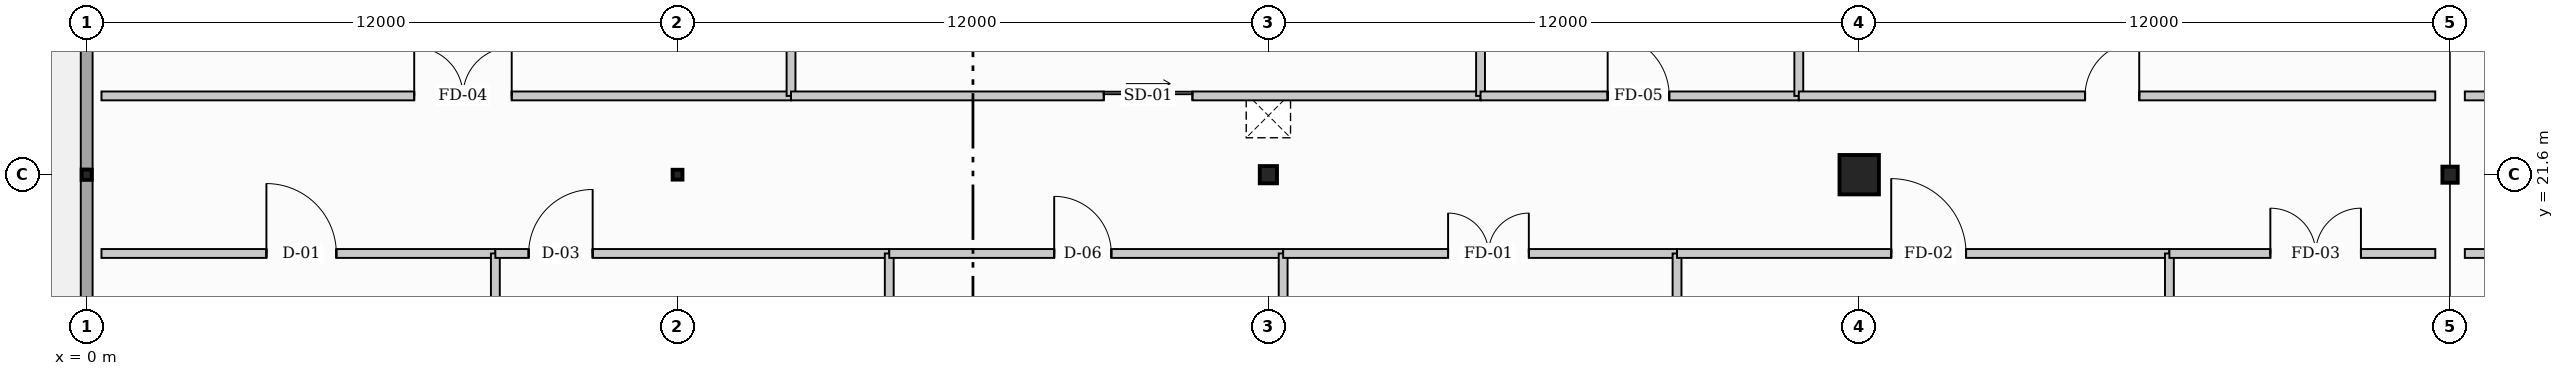
"""IFC4 building model, lengths in metres.
Left out: names, types, materials, properties, quantities, classifications, styles, units other than length and angle.
Written with IfcOpenShell. Run it as: python <this file> out.ifc"""

import sys

from ifc_helpers import new_model, si_unit, direction, frame, frame_2d, origin, origin_2d, place, context, subcontext, project, spatial, rectangle, hollow_rectangle, i_section, extrude, element, fill, save


model = new_model("IFC4")
c1 = context("Model", 3, precision=1e-05, world=origin(), true_north=direction((0.0, 1.0)))
c2 = subcontext(c1, "Body", "Model", "MODEL_VIEW")
j1 = project(units=[si_unit("LENGTHUNIT", "METRE"), si_unit("PLANEANGLEUNIT", "RADIAN")], contexts=[c1])
p1 = place(None, origin())
s1 = spatial("IfcSite", under=j1, at=p1, CompositionType="ELEMENT")
p2 = place(p1, origin())
s2 = spatial("IfcBuilding", under=s1, at=p2, CompositionType="ELEMENT")
p3 = place(p2, frame((0.0, 0.0, -4.8)))
s3 = spatial("IfcBuildingStorey", under=s2, at=p3, CompositionType="ELEMENT", Elevation=-4.8)
p4 = place(p3, frame((0.0, 21.6, 0.0), z_axis=(0.0, 0.0, 1.0), x_axis=(1.0, 0.0, 0.0)))
e1 = element("IfcColumn", 1, at=p4, inside=s3, PredefinedType="COLUMN", context=c2, shape_type="SweptSolid", body=[
    extrude(i_section(OverallWidth=0.205, OverallDepth=0.21, WebThickness=0.009, FlangeThickness=0.014, at=origin_2d()), origin(), (0.0, 0.0, 1.0), 4.8),
])
p5 = place(p3, frame((12.0, 21.6, 0.0), z_axis=(0.0, 0.0, 1.0), x_axis=(0.0, 1.0, 0.0)))
e2 = element("IfcColumn", 2, at=p5, inside=s3, PredefinedType="COLUMN", context=c2, shape_type="SweptSolid", body=[
    extrude(hollow_rectangle(XDim=0.2, YDim=0.2, WallThickness=0.01, at=origin_2d()), origin(), (0.0, 0.0, 1.0), 4.8),
])
p6 = place(p3, frame((24.0, 21.6, 0.0), z_axis=(0.0, 0.0, 1.0), x_axis=(1.0, 0.0, 0.0)))
e3 = element("IfcColumn", 3, at=p6, inside=s3, PredefinedType="COLUMN", context=c2, shape_type="SweptSolid", body=[
    extrude(i_section(OverallWidth=0.35, OverallDepth=0.35, WebThickness=0.014, FlangeThickness=0.024, at=origin_2d()), origin(), (0.0, 0.0, 1.0), 4.8),
])
p7 = place(p3, frame((36.0, 21.6, 0.0), z_axis=(0.0, 0.0, 1.0), x_axis=(0.0, 1.0, 0.0)))
e4 = element("IfcColumn", 4, at=p7, inside=s3, PredefinedType="COLUMN", context=c2, shape_type="SweptSolid", body=[
    extrude(rectangle(XDim=0.8, YDim=0.8, at=origin_2d()), origin(), (0.0, 0.0, 1.0), 4.8),
])
p8 = place(p3, frame((48.0, 21.6, 0.0), z_axis=(0.0, 0.0, 1.0), x_axis=(1.0, 0.0, 0.0)))
e5 = element("IfcColumn", 5, at=p8, inside=s3, PredefinedType="COLUMN", context=c2, shape_type="SweptSolid", body=[
    extrude(i_section(OverallWidth=0.311, OverallDepth=0.327, WebThickness=0.016, FlangeThickness=0.025, at=origin_2d()), origin(), (0.0, 0.0, 1.0), 4.8),
])
p9 = place(p3, frame((0.0, 0.0, 0.0), z_axis=(0.0, 0.0, 1.0), x_axis=(0.0, 1.0, 0.0)))
e6 = element("IfcWall", 6, at=p9, inside=s3, PredefinedType="STANDARD", context=c2, shape_type="SweptSolid", body=[
    extrude(rectangle(XDim=45.6, YDim=0.24, at=frame_2d((22.8, 0.0))), origin(), (0.0, 0.0, 1.0), 3.723),
])
p10 = place(p9, frame((15.0, 0.0, 0.0)))
e7 = element("IfcOpeningElement", 7, at=p10, cuts=e6, PredefinedType="OPENING", context=c2, shape_type="SweptSolid", body=[
    extrude(rectangle(XDim=2.46, YDim=2.4, at=frame_2d((1.23, 1.2))), frame((0.0, 0.13, 0.0), z_axis=(0.0, -1.0, 0.0), x_axis=(1.0, 0.0, 0.0)), (0.0, 0.0, 1.0), 0.26),
])
p11 = place(p9, frame((28.0, 0.0, 0.0)))
e8 = element("IfcOpeningElement", 8, at=p11, cuts=e6, PredefinedType="OPENING", context=c2, shape_type="SweptSolid", body=[
    extrude(rectangle(XDim=2.3, YDim=2.3, at=frame_2d((1.15, 1.15))), frame((0.0, 0.13, 0.0), z_axis=(0.0, -1.0, 0.0), x_axis=(1.0, 0.0, 0.0)), (0.0, 0.0, 1.0), 0.26),
])
p12 = place(p9, frame((1.1, 0.0, 1.0)))
e9 = element("IfcOpeningElement", 9, at=p12, cuts=e6, PredefinedType="OPENING", context=c2, shape_type="SweptSolid", body=[
    extrude(rectangle(XDim=2.4, YDim=1.8, at=frame_2d((1.2, 0.9))), frame((0.0, 0.13, 0.0), z_axis=(0.0, -1.0, 0.0), x_axis=(1.0, 0.0, 0.0)), (0.0, 0.0, 1.0), 0.26),
])
p13 = place(p9, frame((5.0, 0.0, 1.0)))
e10 = element("IfcOpeningElement", 10, at=p13, cuts=e6, PredefinedType="OPENING", context=c2, shape_type="SweptSolid", body=[
    extrude(rectangle(XDim=2.4, YDim=1.8, at=frame_2d((1.2, 0.9))), frame((0.0, 0.13, 0.0), z_axis=(0.0, -1.0, 0.0), x_axis=(1.0, 0.0, 0.0)), (0.0, 0.0, 1.0), 0.26),
])
p14 = place(p9, frame((24.5, 0.0, 1.0)))
e11 = element("IfcOpeningElement", 11, at=p14, cuts=e6, PredefinedType="OPENING", context=c2, shape_type="SweptSolid", body=[
    extrude(rectangle(XDim=2.4, YDim=1.8, at=frame_2d((1.2, 0.9))), frame((0.0, 0.13, 0.0), z_axis=(0.0, -1.0, 0.0), x_axis=(1.0, 0.0, 0.0)), (0.0, 0.0, 1.0), 0.26),
])
p15 = place(p9, frame((36.2, 0.0, 1.0)))
e12 = element("IfcOpeningElement", 12, at=p15, cuts=e6, PredefinedType="OPENING", context=c2, shape_type="SweptSolid", body=[
    extrude(rectangle(XDim=2.4, YDim=1.8, at=frame_2d((1.2, 0.9))), frame((0.0, 0.13, 0.0), z_axis=(0.0, -1.0, 0.0), x_axis=(1.0, 0.0, 0.0)), (0.0, 0.0, 1.0), 0.26),
])
p16 = place(p9, frame((40.1, 0.0, 1.0)))
e13 = element("IfcOpeningElement", 13, at=p16, cuts=e6, PredefinedType="OPENING", context=c2, shape_type="SweptSolid", body=[
    extrude(rectangle(XDim=2.4, YDim=1.8, at=frame_2d((1.2, 0.9))), frame((0.0, 0.13, 0.0), z_axis=(0.0, -1.0, 0.0), x_axis=(1.0, 0.0, 0.0)), (0.0, 0.0, 1.0), 0.26),
])
p17 = place(p3, frame((0.3, 20.0, 0.0), z_axis=(0.0, 0.0, 1.0), x_axis=(1.0, 0.0, 0.0)))
e14 = element("IfcWall", 14, at=p17, inside=s3, PredefinedType="PARTITIONING", context=c2, shape_type="SweptSolid", body=[
    extrude(rectangle(XDim=8.0, YDim=0.18, at=frame_2d((4.0, 0.0))), origin(), (0.0, 0.0, 1.0), 4.012),
])
p18 = place(p17, frame((3.35, 0.0, 0.0)))
e15 = element("IfcOpeningElement", 15, at=p18, cuts=e14, PredefinedType="OPENING", context=c2, shape_type="SweptSolid", body=[
    extrude(rectangle(XDim=1.42, YDim=2.22, at=frame_2d((0.71, 1.11))), frame((0.0, 0.1, 0.0), z_axis=(0.0, -1.0, 0.0), x_axis=(1.0, 0.0, 0.0)), (0.0, 0.0, 1.0), 0.2),
])
p19 = place(p3, frame((8.3, 0.3, 0.0), z_axis=(0.0, 0.0, 1.0), x_axis=(0.0, 1.0, 0.0)))
e16 = element("IfcWall", 16, at=p19, inside=s3, PredefinedType="PARTITIONING", context=c2, shape_type="SweptSolid", body=[
    extrude(rectangle(XDim=19.7, YDim=0.18, at=frame_2d((9.85, 0.0))), origin(), (0.0, 0.0, 1.0), 3.723),
])
p20 = place(p3, frame((8.3, 20.0, 0.0), z_axis=(0.0, 0.0, 1.0), x_axis=(1.0, 0.0, 0.0)))
e17 = element("IfcWall", 17, at=p20, inside=s3, PredefinedType="PARTITIONING", context=c2, shape_type="SweptSolid", body=[
    extrude(rectangle(XDim=8.0, YDim=0.18, at=frame_2d((4.0, 0.0))), origin(), (0.0, 0.0, 1.0), 3.882),
])
p21 = place(p20, frame((0.676, 0.0, 0.0)))
e18 = element("IfcOpeningElement", 18, at=p21, cuts=e17, PredefinedType="OPENING", context=c2, shape_type="SweptSolid", body=[
    extrude(rectangle(XDim=1.3, YDim=2.16, at=frame_2d((0.65, 1.08))), frame((0.0, 0.1, 0.0), z_axis=(0.0, -1.0, 0.0), x_axis=(1.0, 0.0, 0.0)), (0.0, 0.0, 1.0), 0.2),
])
p22 = place(p3, frame((16.3, 0.3, 0.0), z_axis=(0.0, 0.0, 1.0), x_axis=(0.0, 1.0, 0.0)))
e19 = element("IfcWall", 19, at=p22, inside=s3, PredefinedType="PARTITIONING", context=c2, shape_type="SweptSolid", body=[
    extrude(rectangle(XDim=19.7, YDim=0.18, at=frame_2d((9.85, 0.0))), origin(), (0.0, 0.0, 1.0), 3.803),
])
p23 = place(p3, frame((16.3, 20.0, 0.0), z_axis=(0.0, 0.0, 1.0), x_axis=(1.0, 0.0, 0.0)))
e20 = element("IfcWall", 20, at=p23, inside=s3, PredefinedType="PARTITIONING", context=c2, shape_type="SweptSolid", body=[
    extrude(rectangle(XDim=8.0, YDim=0.18, at=frame_2d((4.0, 0.0))), origin(), (0.0, 0.0, 1.0), 3.887),
])
p24 = place(p23, frame((3.35, 0.0, 0.0)))
e21 = element("IfcOpeningElement", 21, at=p24, cuts=e20, PredefinedType="OPENING", context=c2, shape_type="SweptSolid", body=[
    extrude(rectangle(XDim=1.16, YDim=2.1, at=frame_2d((0.58, 1.05))), frame((0.0, 0.1, 0.0), z_axis=(0.0, -1.0, 0.0), x_axis=(1.0, 0.0, 0.0)), (0.0, 0.0, 1.0), 0.2),
])
p25 = place(p3, frame((24.3, 0.3, 0.0), z_axis=(0.0, 0.0, 1.0), x_axis=(0.0, 1.0, 0.0)))
e22 = element("IfcWall", 22, at=p25, inside=s3, PredefinedType="PARTITIONING", context=c2, shape_type="SweptSolid", body=[
    extrude(rectangle(XDim=19.7, YDim=0.18, at=frame_2d((9.85, 0.0))), origin(), (0.0, 0.0, 1.0), 3.803),
])
p26 = place(p3, frame((24.3, 20.0, 0.0), z_axis=(0.0, 0.0, 1.0), x_axis=(1.0, 0.0, 0.0)))
e23 = element("IfcWall", 23, at=p26, inside=s3, PredefinedType="PARTITIONING", context=c2, shape_type="SweptSolid", body=[
    extrude(rectangle(XDim=8.0, YDim=0.18, at=frame_2d((4.0, 0.0))), origin(), (0.0, 0.0, 1.0), 3.887),
])
p27 = place(p26, frame((3.35, 0.0, 0.0)))
e24 = element("IfcOpeningElement", 24, at=p27, cuts=e23, PredefinedType="OPENING", context=c2, shape_type="SweptSolid", body=[
    extrude(rectangle(XDim=1.64, YDim=2.2, at=frame_2d((0.82, 1.1))), frame((0.0, 0.1, 0.0), z_axis=(0.0, -1.0, 0.0), x_axis=(1.0, 0.0, 0.0)), (0.0, 0.0, 1.0), 0.2),
])
p28 = place(p3, frame((32.3, 0.3, 0.0), z_axis=(0.0, 0.0, 1.0), x_axis=(0.0, 1.0, 0.0)))
e25 = element("IfcWall", 25, at=p28, inside=s3, PredefinedType="PARTITIONING", context=c2, shape_type="SweptSolid", body=[
    extrude(rectangle(XDim=19.7, YDim=0.18, at=frame_2d((9.85, 0.0))), origin(), (0.0, 0.0, 1.0), 3.808),
])
p29 = place(p3, frame((32.3, 20.0, 0.0), z_axis=(0.0, 0.0, 1.0), x_axis=(1.0, 0.0, 0.0)))
e26 = element("IfcWall", 26, at=p29, inside=s3, PredefinedType="PARTITIONING", context=c2, shape_type="SweptSolid", body=[
    extrude(rectangle(XDim=10.0, YDim=0.18, at=frame_2d((5.0, 0.0))), origin(), (0.0, 0.0, 1.0), 3.955),
])
p30 = place(p29, frame((4.35, 0.0, 0.0)))
e27 = element("IfcOpeningElement", 27, at=p30, cuts=e26, PredefinedType="OPENING", context=c2, shape_type="SweptSolid", body=[
    extrude(rectangle(XDim=1.52, YDim=2.16, at=frame_2d((0.76, 1.08))), frame((0.0, 0.1, 0.0), z_axis=(0.0, -1.0, 0.0), x_axis=(1.0, 0.0, 0.0)), (0.0, 0.0, 1.0), 0.2),
])
p31 = place(p3, frame((42.3, 0.3, 0.0), z_axis=(0.0, 0.0, 1.0), x_axis=(0.0, 1.0, 0.0)))
e28 = element("IfcWall", 28, at=p31, inside=s3, PredefinedType="PARTITIONING", context=c2, shape_type="SweptSolid", body=[
    extrude(rectangle(XDim=19.7, YDim=0.18, at=frame_2d((9.85, 0.0))), origin(), (0.0, 0.0, 1.0), 3.813),
])
p32 = place(p3, frame((42.3, 20.0, 0.0), z_axis=(0.0, 0.0, 1.0), x_axis=(1.0, 0.0, 0.0)))
e29 = element("IfcWall", 29, at=p32, inside=s3, PredefinedType="PARTITIONING", context=c2, shape_type="SweptSolid", body=[
    extrude(rectangle(XDim=5.4, YDim=0.18, at=frame_2d((2.7, 0.0))), origin(), (0.0, 0.0, 1.0), 3.958),
])
p33 = place(p32, frame((2.05, 0.0, 0.0)))
e30 = element("IfcOpeningElement", 30, at=p33, cuts=e29, PredefinedType="OPENING", context=c2, shape_type="SweptSolid", body=[
    extrude(rectangle(XDim=1.84, YDim=2.22, at=frame_2d((0.92, 1.11))), frame((0.0, 0.1, 0.0), z_axis=(0.0, -1.0, 0.0), x_axis=(1.0, 0.0, 0.0)), (0.0, 0.0, 1.0), 0.2),
])
p34 = place(p3, frame((0.3, 23.2, 0.0), z_axis=(0.0, 0.0, 1.0), x_axis=(1.0, 0.0, 0.0)))
e31 = element("IfcWall", 31, at=p34, inside=s3, PredefinedType="PARTITIONING", context=c2, shape_type="SweptSolid", body=[
    extrude(rectangle(XDim=14.005, YDim=0.18, at=frame_2d((7.002, 0.0))), origin(), (0.0, 0.0, 1.0), 3.887),
])
p35 = place(p34, frame((6.352, 0.0, 0.0)))
e32 = element("IfcOpeningElement", 32, at=p35, cuts=e31, PredefinedType="OPENING", context=c2, shape_type="SweptSolid", body=[
    extrude(rectangle(XDim=1.98, YDim=2.26, at=frame_2d((0.99, 1.13))), frame((0.0, 0.1, 0.0), z_axis=(0.0, -1.0, 0.0), x_axis=(1.0, 0.0, 0.0)), (0.0, 0.0, 1.0), 0.2),
])
p36 = place(p3, frame((14.305, 23.2, 0.0), z_axis=(0.0, 0.0, 1.0), x_axis=(0.0, 1.0, 0.0)))
e33 = element("IfcWall", 33, at=p36, inside=s3, PredefinedType="PARTITIONING", context=c2, shape_type="SweptSolid", body=[
    extrude(rectangle(XDim=11.35, YDim=0.18, at=frame_2d((5.675, 0.0))), origin(), (0.0, 0.0, 1.0), 3.813),
])
p37 = place(p3, frame((14.305, 23.2, 0.0), z_axis=(0.0, 0.0, 1.0), x_axis=(1.0, 0.0, 0.0)))
e34 = element("IfcWall", 34, at=p37, inside=s3, PredefinedType="PARTITIONING", context=c2, shape_type="SweptSolid", body=[
    extrude(rectangle(XDim=14.004, YDim=0.18, at=frame_2d((7.002, 0.0))), origin(), (0.0, 0.0, 1.0), 3.955),
])
p38 = place(p37, frame((6.352, 0.0, 0.0)))
e35 = element("IfcOpeningElement", 35, at=p38, cuts=e34, PredefinedType="OPENING", context=c2, shape_type="SweptSolid", body=[
    extrude(rectangle(XDim=1.8, YDim=2.32, at=frame_2d((0.9, 1.16))), frame((0.0, 0.1, 0.0), z_axis=(0.0, -1.0, 0.0), x_axis=(1.0, 0.0, 0.0)), (0.0, 0.0, 1.0), 0.2),
])
p39 = place(p3, frame((28.309, 23.2, 0.0), z_axis=(0.0, 0.0, 1.0), x_axis=(0.0, 1.0, 0.0)))
e36 = element("IfcWall", 36, at=p39, inside=s3, PredefinedType="PARTITIONING", context=c2, shape_type="SweptSolid", body=[
    extrude(rectangle(XDim=22.1, YDim=0.18, at=frame_2d((11.05, 0.0))), origin(), (0.0, 0.0, 1.0), 3.882),
])
p40 = place(p3, frame((28.309, 23.2, 0.0), z_axis=(0.0, 0.0, 1.0), x_axis=(1.0, 0.0, 0.0)))
e37 = element("IfcWall", 37, at=p40, inside=s3, PredefinedType="PARTITIONING", context=c2, shape_type="SweptSolid", body=[
    extrude(rectangle(XDim=6.464, YDim=0.18, at=frame_2d((3.232, 0.0))), origin(), (0.0, 0.0, 1.0), 4.43),
])
p41 = place(p40, frame((2.582, 0.0, 0.0)))
e38 = element("IfcOpeningElement", 38, at=p41, cuts=e37, PredefinedType="OPENING", context=c2, shape_type="SweptSolid", body=[
    extrude(rectangle(XDim=1.25, YDim=2.15, at=frame_2d((0.625, 1.075))), frame((0.0, 0.1, 0.0), z_axis=(0.0, -1.0, 0.0), x_axis=(1.0, 0.0, 0.0)), (0.0, 0.0, 1.0), 0.2),
])
p42 = place(p3, frame((34.773, 23.2, 0.0), z_axis=(0.0, 0.0, 1.0), x_axis=(0.0, 1.0, 0.0)))
e39 = element("IfcWall", 39, at=p42, inside=s3, PredefinedType="PARTITIONING", context=c2, shape_type="SweptSolid", body=[
    extrude(rectangle(XDim=22.1, YDim=0.18, at=frame_2d((11.05, 0.0))), origin(), (0.0, 0.0, 1.0), 3.882),
])
p43 = place(p3, frame((34.773, 23.2, 0.0), z_axis=(0.0, 0.0, 1.0), x_axis=(1.0, 0.0, 0.0)))
e40 = element("IfcWall", 40, at=p43, inside=s3, PredefinedType="PARTITIONING", context=c2, shape_type="SweptSolid", body=[
    extrude(rectangle(XDim=12.927, YDim=0.18, at=frame_2d((6.463, 0.0))), origin(), (0.0, 0.0, 1.0), 3.958),
])
p44 = place(p43, frame((5.814, 0.0, 0.0)))
e41 = element("IfcOpeningElement", 41, at=p44, cuts=e40, PredefinedType="OPENING", context=c2, shape_type="SweptSolid", body=[
    extrude(rectangle(XDim=1.1, YDim=2.15, at=frame_2d((0.55, 1.075))), frame((0.0, 0.1, 0.0), z_axis=(0.0, -1.0, 0.0), x_axis=(1.0, 0.0, 0.0)), (0.0, 0.0, 1.0), 0.2),
])
p45 = place(p3, frame((48.3, 20.0, 0.0), z_axis=(0.0, 0.0, 1.0), x_axis=(1.0, 0.0, 0.0)))
e42 = element("IfcWall", 42, at=p45, inside=s3, PredefinedType="PARTITIONING", context=c2, shape_type="SweptSolid", body=[
    extrude(rectangle(XDim=13.65, YDim=0.18, at=frame_2d((6.825, 0.0))), origin(), (0.0, 0.0, 1.0), 3.958),
])
p46 = place(p45, frame((6.175, 0.0, 0.0)))
e43 = element("IfcOpeningElement", 43, at=p46, cuts=e42, PredefinedType="OPENING", context=c2, shape_type="SweptSolid", body=[
    extrude(rectangle(XDim=1.84, YDim=2.22, at=frame_2d((0.92, 1.11))), frame((0.0, 0.1, 0.0), z_axis=(0.0, -1.0, 0.0), x_axis=(1.0, 0.0, 0.0)), (0.0, 0.0, 1.0), 0.2),
])
p47 = place(p3, frame((48.3, 23.2, 0.0), z_axis=(0.0, 0.0, 1.0), x_axis=(1.0, 0.0, 0.0)))
e44 = element("IfcWall", 44, at=p47, inside=s3, PredefinedType="PARTITIONING", context=c2, shape_type="SweptSolid", body=[
    extrude(rectangle(XDim=29.05, YDim=0.18, at=frame_2d((14.525, 0.0))), origin(), (0.0, 0.0, 1.0), 3.465),
])
p48 = place(p47, frame((13.875, 0.0, 0.0)))
e45 = element("IfcOpeningElement", 45, at=p48, cuts=e44, PredefinedType="OPENING", context=c2, shape_type="SweptSolid", body=[
    extrude(rectangle(XDim=1.1, YDim=2.15, at=frame_2d((0.55, 1.075))), frame((0.0, 0.1, 0.0), z_axis=(0.0, -1.0, 0.0), x_axis=(1.0, 0.0, 0.0)), (0.0, 0.0, 1.0), 0.2),
])
p49 = place(p18, origin())
e46 = element("IfcDoor", 46, at=p49, inside=s3, OperationType="SINGLE_SWING_LEFT", PredefinedType="DOOR", context=c2, shape_type="SweptSolid", body=[
    extrude(rectangle(XDim=1.42, YDim=2.22, at=frame_2d((0.71, 1.11))), frame((0.0, 0.025, 0.0), z_axis=(0.0, -1.0, 0.0), x_axis=(1.0, 0.0, 0.0)), (0.0, 0.0, 1.0), 0.05),
])
fill(e15, e46)
p50 = place(p21, origin())
e47 = element("IfcDoor", 47, at=p50, inside=s3, OperationType="SINGLE_SWING_RIGHT", PredefinedType="DOOR", context=c2, shape_type="SweptSolid", body=[
    extrude(rectangle(XDim=1.3, YDim=2.16, at=frame_2d((0.65, 1.08))), frame((0.0, 0.025, 0.0), z_axis=(0.0, -1.0, 0.0), x_axis=(1.0, 0.0, 0.0)), (0.0, 0.0, 1.0), 0.05),
])
fill(e18, e47)
p51 = place(p24, origin())
e48 = element("IfcDoor", 48, at=p51, inside=s3, OperationType="SINGLE_SWING_LEFT", PredefinedType="DOOR", context=c2, shape_type="SweptSolid", body=[
    extrude(rectangle(XDim=1.16, YDim=2.1, at=frame_2d((0.58, 1.05))), frame((0.0, 0.025, 0.0), z_axis=(0.0, -1.0, 0.0), x_axis=(1.0, 0.0, 0.0)), (0.0, 0.0, 1.0), 0.05),
])
fill(e21, e48)
p52 = place(p27, origin())
e49 = element("IfcDoor", 49, at=p52, inside=s3, OperationType="DOUBLE_DOOR_SINGLE_SWING", PredefinedType="DOOR", context=c2, shape_type="SweptSolid", body=[
    extrude(rectangle(XDim=1.64, YDim=2.2, at=frame_2d((0.82, 1.1))), frame((0.0, 0.025, 0.0), z_axis=(0.0, -1.0, 0.0), x_axis=(1.0, 0.0, 0.0)), (0.0, 0.0, 1.0), 0.05),
])
fill(e24, e49)
p53 = place(p30, origin())
e50 = element("IfcDoor", 50, at=p53, inside=s3, OperationType="SINGLE_SWING_LEFT", PredefinedType="DOOR", context=c2, shape_type="SweptSolid", body=[
    extrude(rectangle(XDim=1.52, YDim=2.16, at=frame_2d((0.76, 1.08))), frame((0.0, 0.025, 0.0), z_axis=(0.0, -1.0, 0.0), x_axis=(1.0, 0.0, 0.0)), (0.0, 0.0, 1.0), 0.05),
])
fill(e27, e50)
p54 = place(p33, origin())
e51 = element("IfcDoor", 51, at=p54, inside=s3, OperationType="DOUBLE_DOOR_SINGLE_SWING", PredefinedType="DOOR", context=c2, shape_type="SweptSolid", body=[
    extrude(rectangle(XDim=1.84, YDim=2.22, at=frame_2d((0.92, 1.11))), frame((0.0, 0.025, 0.0), z_axis=(0.0, -1.0, 0.0), x_axis=(1.0, 0.0, 0.0)), (0.0, 0.0, 1.0), 0.05),
])
fill(e30, e51)
p55 = place(p35, origin())
e52 = element("IfcDoor", 52, at=p55, inside=s3, OperationType="DOUBLE_DOOR_SINGLE_SWING", PredefinedType="DOOR", context=c2, shape_type="SweptSolid", body=[
    extrude(rectangle(XDim=1.98, YDim=2.26, at=frame_2d((0.99, 1.13))), frame((0.0, 0.025, 0.0), z_axis=(0.0, -1.0, 0.0), x_axis=(1.0, 0.0, 0.0)), (0.0, 0.0, 1.0), 0.05),
])
fill(e32, e52)
p56 = place(p38, origin())
e53 = element("IfcDoor", 53, at=p56, inside=s3, OperationType="SLIDING_TO_LEFT", PredefinedType="DOOR", context=c2, shape_type="SweptSolid", body=[
    extrude(rectangle(XDim=1.8, YDim=2.32, at=frame_2d((0.9, 1.16))), frame((0.0, 0.025, 0.0), z_axis=(0.0, -1.0, 0.0), x_axis=(1.0, 0.0, 0.0)), (0.0, 0.0, 1.0), 0.05),
])
fill(e35, e53)
p57 = place(p41, origin())
e54 = element("IfcDoor", 54, at=p57, inside=s3, OperationType="SINGLE_SWING_LEFT", PredefinedType="DOOR", context=c2, shape_type="SweptSolid", body=[
    extrude(rectangle(XDim=1.25, YDim=2.15, at=frame_2d((0.625, 1.075))), frame((0.0, 0.025, 0.0), z_axis=(0.0, -1.0, 0.0), x_axis=(1.0, 0.0, 0.0)), (0.0, 0.0, 1.0), 0.05),
])
fill(e38, e54)
p58 = place(p44, origin())
e55 = element("IfcDoor", 55, at=p58, inside=s3, OperationType="SINGLE_SWING_RIGHT", PredefinedType="DOOR", context=c2, shape_type="SweptSolid", body=[
    extrude(rectangle(XDim=1.1, YDim=2.15, at=frame_2d((0.55, 1.075))), frame((0.0, 0.025, 0.0), z_axis=(0.0, -1.0, 0.0), x_axis=(1.0, 0.0, 0.0)), (0.0, 0.0, 1.0), 0.05),
])
fill(e41, e55)
save(model, sys.argv[1])
